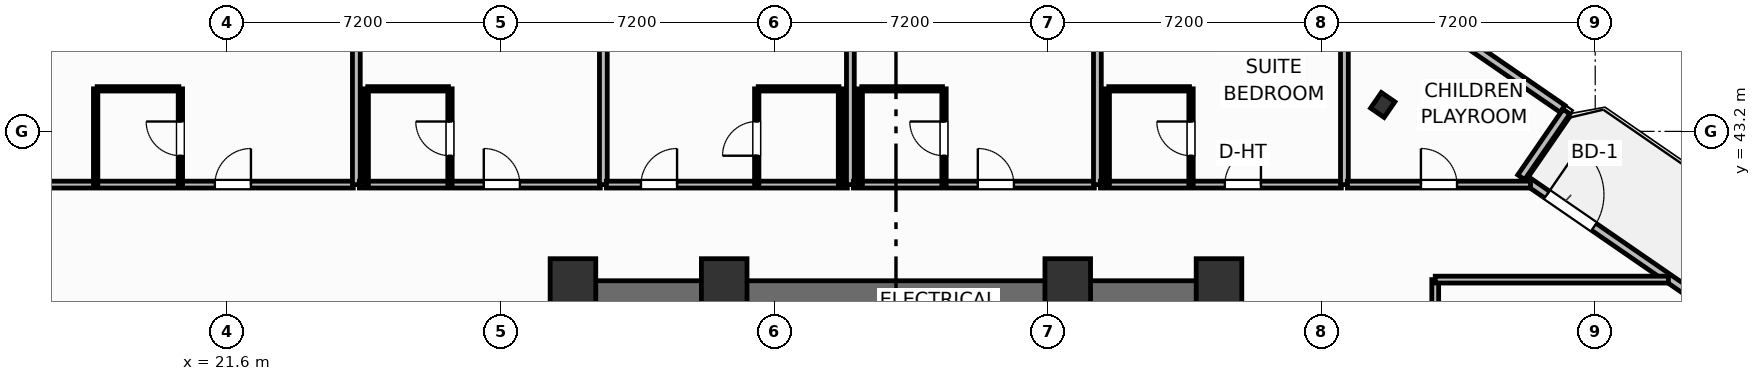
"""IFC4 building model, lengths in metres.
Left out: names, types, materials, properties, quantities, classifications, styles, units other than length and angle.
Written with IfcOpenShell. Run it as: python <this file> out.ifc"""

import sys

from ifc_helpers import new_model, si_unit, direction, frame, frame_2d, origin, origin_2d, place, context, subcontext, project, spatial, rectangle, i_section, extrude, element, fill, save


model = new_model("IFC4")
c1 = context("Model", 3, precision=1e-05, world=origin(), true_north=direction((0.0, 1.0)))
c2 = subcontext(c1, "Body", "Model", "MODEL_VIEW")
j1 = project(units=[si_unit("LENGTHUNIT", "METRE"), si_unit("PLANEANGLEUNIT", "RADIAN")], contexts=[c1])
p1 = place(None, origin())
s1 = spatial("IfcSite", under=j1, at=p1, CompositionType="ELEMENT")
p2 = place(p1, origin())
s2 = spatial("IfcBuilding", under=s1, at=p2, CompositionType="ELEMENT")
p3 = place(p2, frame((0.0, 0.0, 64.0)))
s3 = spatial("IfcBuildingStorey", under=s2, at=p3, CompositionType="ELEMENT", Elevation=64.0)
for number, where, z_axis, x_axis in (
    (1, (30.7, 39.05, 0.0), (0.0, 0.0, 1.0), (1.0, 0.0, 0.0)),
    (2, (34.68, 39.05, 0.0), (0.0, 0.0, 1.0), (1.0, 0.0, 0.0)),
    (3, (43.72, 39.05, 0.0), (0.0, 0.0, 1.0), (1.0, 0.0, 0.0)),
    (4, (47.7, 39.05, 0.0), (0.0, 0.0, 1.0), (1.0, 0.0, 0.0)),
):
    element("IfcColumn", number, at=place(p3, frame(where, z_axis=z_axis, x_axis=x_axis)), inside=s3, PredefinedType="COLUMN", context=c2, shape_type="SweptSolid", body=[
        extrude(rectangle(XDim=1.2, YDim=1.6, at=origin_2d()), origin(), (0.0, 0.0, 1.0), 3.7),
    ])
p4 = place(p3, frame((30.28, 38.845, 0.0), z_axis=(0.0, 0.0, 1.0), x_axis=(1.0, 0.0, 0.0)))
e5 = element("IfcWall", 5, at=p4, inside=s3, PredefinedType="SHEAR", context=c2, shape_type="SweptSolid", body=[
    extrude(rectangle(XDim=17.84, YDim=0.85, at=frame_2d((8.92, 0.0))), origin(), (0.0, 0.0, 1.0), 3.45),
])
p5 = place(p3, frame((52.009, 43.896, 0.0), z_axis=(0.0, 0.0, 1.0), x_axis=(0.823532597628, -0.567268949127, 0.0)))
e6 = element("IfcColumn", 6, at=p5, inside=s3, PredefinedType="COLUMN", context=c2, shape_type="SweptSolid", body=[
    extrude(i_section(OverallWidth=0.432, OverallDepth=0.498, WebThickness=0.056, FlangeThickness=0.089, FilletRadius=0.025, at=origin_2d()), origin(), (0.0, 0.0, 1.0), 3.7),
])
p6 = place(p3, frame((55.757, 41.933, 0.0), z_axis=(0.0, 0.0, 1.0), x_axis=(0.823534636215, -0.567265989598, 0.0)))
e7 = element("IfcWall", 7, at=p6, inside=s3, PredefinedType="SOLIDWALL", context=c2, shape_type="SweptSolid", body=[
    extrude(rectangle(XDim=6.0, YDim=0.22, at=frame_2d((3.0, 0.0))), origin(), (0.0, 0.0, 1.0), 2.73),
])
p7 = place(p6, frame((0.696, 0.0, 0.0)))
e8 = element("IfcOpeningElement", 8, at=p7, cuts=e7, PredefinedType="OPENING", context=c2, shape_type="SweptSolid", body=[
    extrude(rectangle(XDim=1.5, YDim=2.25, at=frame_2d((0.75, 1.125))), frame((0.0, 0.12, 0.0), z_axis=(0.0, -1.0, 0.0), x_axis=(1.0, 0.0, 0.0)), (0.0, 0.0, 1.0), 0.24),
])
p8 = place(p3, frame((55.653, 41.993, 0.0), z_axis=(0.0, 0.0, 1.0), x_axis=(0.567273696173, 0.823529327729, 0.0)))
e9 = element("IfcWall", 9, at=p8, inside=s3, PredefinedType="SOLIDWALL", context=c2, shape_type="SweptSolid", body=[
    extrude(rectangle(XDim=2.1, YDim=0.22, at=frame_2d((1.05, 0.0))), origin(), (0.0, 0.0, 1.0), 2.73),
])
p9 = place(p3, frame((56.741, 43.793, 0.0), z_axis=(0.0, 0.0, 1.0), x_axis=(-0.823530942962, 0.56727135128, 0.0)))
e10 = element("IfcWall", 10, at=p9, inside=s3, PredefinedType="SOLIDWALL", context=c2, shape_type="SweptSolid", body=[
    extrude(rectangle(XDim=8.035, YDim=0.22, at=frame_2d((4.018, 0.0))), origin(), (0.0, 0.0, 1.0), 2.73),
])
p10 = place(p9, frame((3.192, 0.0, 0.8)))
e11 = element("IfcOpeningElement", 11, at=p10, cuts=e10, PredefinedType="OPENING", context=c2, shape_type="SweptSolid", body=[
    extrude(rectangle(XDim=1.65, YDim=1.65, at=frame_2d((0.825, 0.825))), frame((0.0, 0.12, 0.0), z_axis=(0.0, -1.0, 0.0), x_axis=(1.0, 0.0, 0.0)), (0.0, 0.0, 1.0), 0.24),
])
p11 = place(p3, frame((3.176, 41.8, 0.0), z_axis=(0.0, 0.0, 1.0), x_axis=(1.0, 0.0, 0.0)))
e12 = element("IfcWall", 12, at=p11, inside=s3, PredefinedType="PARTITIONING", context=c2, shape_type="SweptSolid", body=[
    extrude(rectangle(XDim=21.744, YDim=0.18, at=frame_2d((10.872, 0.0))), origin(), (0.0, 0.0, 1.0), 3.45),
])
p12 = place(p11, frame((18.101, 0.0, 0.0)))
e13 = element("IfcOpeningElement", 13, at=p12, cuts=e12, PredefinedType="OPENING", context=c2, shape_type="SweptSolid", body=[
    extrude(rectangle(XDim=0.95, YDim=2.15, at=frame_2d((0.475, 1.075))), frame((0.0, 0.1, 0.0), z_axis=(0.0, -1.0, 0.0), x_axis=(1.0, 0.0, 0.0)), (0.0, 0.0, 1.0), 0.2),
])
p13 = place(p3, frame((18.18, 44.32, 0.0), z_axis=(0.0, 0.0, 1.0), x_axis=(1.0, 0.0, 0.0)))
e14 = element("IfcWall", 14, at=p13, inside=s3, PredefinedType="PARTITIONING", context=c2, shape_type="SweptSolid", body=[
    extrude(rectangle(XDim=2.15, YDim=0.115, at=frame_2d((1.075, 0.0))), origin(), (0.0, 0.0, 1.0), 3.45),
])
p14 = place(p3, frame((20.37, 41.8, 0.0), z_axis=(0.0, 0.0, 1.0), x_axis=(0.0, 1.0, 0.0)))
e15 = element("IfcWall", 15, at=p14, inside=s3, PredefinedType="PARTITIONING", context=c2, shape_type="SweptSolid", body=[
    extrude(rectangle(XDim=2.52, YDim=0.115, at=frame_2d((1.26, 0.0))), origin(), (0.0, 0.0, 1.0), 3.45),
])
p15 = place(p14, frame((0.76, 0.0, 0.0)))
e16 = element("IfcOpeningElement", 16, at=p15, cuts=e15, PredefinedType="OPENING", context=c2, shape_type="SweptSolid", body=[
    extrude(rectangle(XDim=0.9, YDim=2.05, at=frame_2d((0.45, 1.025))), frame((0.0, 0.067, 0.0), z_axis=(0.0, -1.0, 0.0), x_axis=(1.0, 0.0, 0.0)), (0.0, 0.0, 1.0), 0.135),
])
p16 = place(p3, frame((18.14, 41.8, 0.0), z_axis=(0.0, 0.0, 1.0), x_axis=(0.0, 1.0, 0.0)))
e17 = element("IfcWall", 17, at=p16, inside=s3, PredefinedType="PARTITIONING", context=c2, shape_type="SweptSolid", body=[
    extrude(rectangle(XDim=2.52, YDim=0.115, at=frame_2d((1.26, 0.0))), origin(), (0.0, 0.0, 1.0), 3.45),
])
p17 = place(p3, frame((25.0, 41.8, 0.0), z_axis=(0.0, 0.0, 1.0), x_axis=(0.0, 1.0, 0.0)))
e18 = element("IfcWall", 18, at=p17, inside=s3, PredefinedType="PARTITIONING", context=c2, shape_type="SweptSolid", body=[
    extrude(rectangle(XDim=14.2, YDim=0.205, at=frame_2d((7.1, 0.0))), origin(), (0.0, 0.0, 1.0), 3.45),
])
p18 = place(p3, frame((25.08, 41.8, 0.0), z_axis=(0.0, 0.0, 1.0), x_axis=(1.0, 0.0, 0.0)))
e19 = element("IfcWall", 19, at=p18, inside=s3, PredefinedType="PARTITIONING", context=c2, shape_type="SweptSolid", body=[
    extrude(rectangle(XDim=6.34, YDim=0.18, at=frame_2d((3.17, 0.0))), origin(), (0.0, 0.0, 1.0), 3.45),
])
p19 = place(p18, frame((3.274, 0.0, 0.0)))
e20 = element("IfcOpeningElement", 20, at=p19, cuts=e19, PredefinedType="OPENING", context=c2, shape_type="SweptSolid", body=[
    extrude(rectangle(XDim=0.95, YDim=2.15, at=frame_2d((0.475, 1.075))), frame((0.0, 0.1, 0.0), z_axis=(0.0, -1.0, 0.0), x_axis=(1.0, 0.0, 0.0)), (0.0, 0.0, 1.0), 0.2),
])
p20 = place(p3, frame((25.3, 44.32, 0.0), z_axis=(0.0, 0.0, 1.0), x_axis=(1.0, 0.0, 0.0)))
e21 = element("IfcWall", 21, at=p20, inside=s3, PredefinedType="PARTITIONING", context=c2, shape_type="SweptSolid", body=[
    extrude(rectangle(XDim=2.124, YDim=0.115, at=frame_2d((1.062, 0.0))), origin(), (0.0, 0.0, 1.0), 3.45),
])
p21 = place(p3, frame((27.464, 41.8, 0.0), z_axis=(0.0, 0.0, 1.0), x_axis=(0.0, 1.0, 0.0)))
e22 = element("IfcWall", 22, at=p21, inside=s3, PredefinedType="PARTITIONING", context=c2, shape_type="SweptSolid", body=[
    extrude(rectangle(XDim=2.52, YDim=0.115, at=frame_2d((1.26, 0.0))), origin(), (0.0, 0.0, 1.0), 3.45),
])
p22 = place(p21, frame((0.76, 0.0, 0.0)))
e23 = element("IfcOpeningElement", 23, at=p22, cuts=e22, PredefinedType="OPENING", context=c2, shape_type="SweptSolid", body=[
    extrude(rectangle(XDim=0.9, YDim=2.05, at=frame_2d((0.45, 1.025))), frame((0.0, 0.067, 0.0), z_axis=(0.0, -1.0, 0.0), x_axis=(1.0, 0.0, 0.0)), (0.0, 0.0, 1.0), 0.135),
])
p23 = place(p3, frame((25.26, 41.8, 0.0), z_axis=(0.0, 0.0, 1.0), x_axis=(0.0, 1.0, 0.0)))
e24 = element("IfcWall", 24, at=p23, inside=s3, PredefinedType="PARTITIONING", context=c2, shape_type="SweptSolid", body=[
    extrude(rectangle(XDim=2.52, YDim=0.115, at=frame_2d((1.26, 0.0))), origin(), (0.0, 0.0, 1.0), 3.45),
])
p24 = place(p3, frame((31.5, 41.8, 0.0), z_axis=(0.0, 0.0, 1.0), x_axis=(0.0, 1.0, 0.0)))
e25 = element("IfcWall", 25, at=p24, inside=s3, PredefinedType="PARTITIONING", context=c2, shape_type="SweptSolid", body=[
    extrude(rectangle(XDim=14.2, YDim=0.205, at=frame_2d((7.1, 0.0))), origin(), (0.0, 0.0, 1.0), 3.45),
])
p25 = place(p3, frame((31.58, 41.8, 0.0), z_axis=(0.0, 0.0, 1.0), x_axis=(1.0, 0.0, 0.0)))
e26 = element("IfcWall", 26, at=p25, inside=s3, PredefinedType="PARTITIONING", context=c2, shape_type="SweptSolid", body=[
    extrude(rectangle(XDim=6.34, YDim=0.18, at=frame_2d((3.17, 0.0))), origin(), (0.0, 0.0, 1.0), 3.45),
])
p26 = place(p25, frame((0.91, 0.0, 0.0)))
e27 = element("IfcOpeningElement", 27, at=p26, cuts=e26, PredefinedType="OPENING", context=c2, shape_type="SweptSolid", body=[
    extrude(rectangle(XDim=0.95, YDim=2.15, at=frame_2d((0.475, 1.075))), frame((0.0, 0.1, 0.0), z_axis=(0.0, -1.0, 0.0), x_axis=(1.0, 0.0, 0.0)), (0.0, 0.0, 1.0), 0.2),
])
p27 = place(p3, frame((35.576, 44.32, 0.0), z_axis=(0.0, 0.0, 1.0), x_axis=(1.0, 0.0, 0.0)))
e28 = element("IfcWall", 28, at=p27, inside=s3, PredefinedType="PARTITIONING", context=c2, shape_type="SweptSolid", body=[
    extrude(rectangle(XDim=2.124, YDim=0.115, at=frame_2d((1.062, 0.0))), origin(), (0.0, 0.0, 1.0), 3.45),
])
p28 = place(p3, frame((35.536, 41.8, 0.0), z_axis=(0.0, 0.0, 1.0), x_axis=(0.0, 1.0, 0.0)))
e29 = element("IfcWall", 29, at=p28, inside=s3, PredefinedType="PARTITIONING", context=c2, shape_type="SweptSolid", body=[
    extrude(rectangle(XDim=2.52, YDim=0.115, at=frame_2d((1.26, 0.0))), origin(), (0.0, 0.0, 1.0), 3.45),
])
p29 = place(p28, frame((0.76, 0.0, 0.0)))
e30 = element("IfcOpeningElement", 30, at=p29, cuts=e29, PredefinedType="OPENING", context=c2, shape_type="SweptSolid", body=[
    extrude(rectangle(XDim=0.9, YDim=2.05, at=frame_2d((0.45, 1.025))), frame((0.0, 0.067, 0.0), z_axis=(0.0, -1.0, 0.0), x_axis=(1.0, 0.0, 0.0)), (0.0, 0.0, 1.0), 0.135),
])
p30 = place(p3, frame((37.74, 41.8, 0.0), z_axis=(0.0, 0.0, 1.0), x_axis=(0.0, 1.0, 0.0)))
e31 = element("IfcWall", 31, at=p30, inside=s3, PredefinedType="PARTITIONING", context=c2, shape_type="SweptSolid", body=[
    extrude(rectangle(XDim=2.52, YDim=0.115, at=frame_2d((1.26, 0.0))), origin(), (0.0, 0.0, 1.0), 3.45),
])
p31 = place(p3, frame((38.0, 41.8, 0.0), z_axis=(0.0, 0.0, 1.0), x_axis=(0.0, 1.0, 0.0)))
e32 = element("IfcWall", 32, at=p31, inside=s3, PredefinedType="PARTITIONING", context=c2, shape_type="SweptSolid", body=[
    extrude(rectangle(XDim=14.797, YDim=0.205, at=frame_2d((7.398, 0.0))), origin(), (0.0, 0.0, 1.0), 3.45),
])
p32 = place(p3, frame((38.08, 41.8, 0.0), z_axis=(0.0, 0.0, 1.0), x_axis=(1.0, 0.0, 0.0)))
e33 = element("IfcWall", 33, at=p32, inside=s3, PredefinedType="PARTITIONING", context=c2, shape_type="SweptSolid", body=[
    extrude(rectangle(XDim=6.34, YDim=0.18, at=frame_2d((3.17, 0.0))), origin(), (0.0, 0.0, 1.0), 3.45),
])
p33 = place(p32, frame((3.274, 0.0, 0.0)))
e34 = element("IfcOpeningElement", 34, at=p33, cuts=e33, PredefinedType="OPENING", context=c2, shape_type="SweptSolid", body=[
    extrude(rectangle(XDim=0.95, YDim=2.15, at=frame_2d((0.475, 1.075))), frame((0.0, 0.1, 0.0), z_axis=(0.0, -1.0, 0.0), x_axis=(1.0, 0.0, 0.0)), (0.0, 0.0, 1.0), 0.2),
])
p34 = place(p3, frame((38.3, 44.32, 0.0), z_axis=(0.0, 0.0, 1.0), x_axis=(1.0, 0.0, 0.0)))
e35 = element("IfcWall", 35, at=p34, inside=s3, PredefinedType="PARTITIONING", context=c2, shape_type="SweptSolid", body=[
    extrude(rectangle(XDim=2.124, YDim=0.115, at=frame_2d((1.062, 0.0))), origin(), (0.0, 0.0, 1.0), 3.45),
])
p35 = place(p3, frame((40.464, 41.8, 0.0), z_axis=(0.0, 0.0, 1.0), x_axis=(0.0, 1.0, 0.0)))
e36 = element("IfcWall", 36, at=p35, inside=s3, PredefinedType="PARTITIONING", context=c2, shape_type="SweptSolid", body=[
    extrude(rectangle(XDim=2.52, YDim=0.115, at=frame_2d((1.26, 0.0))), origin(), (0.0, 0.0, 1.0), 3.45),
])
p36 = place(p35, frame((0.76, 0.0, 0.0)))
e37 = element("IfcOpeningElement", 37, at=p36, cuts=e36, PredefinedType="OPENING", context=c2, shape_type="SweptSolid", body=[
    extrude(rectangle(XDim=0.9, YDim=2.05, at=frame_2d((0.45, 1.025))), frame((0.0, 0.067, 0.0), z_axis=(0.0, -1.0, 0.0), x_axis=(1.0, 0.0, 0.0)), (0.0, 0.0, 1.0), 0.135),
])
p37 = place(p3, frame((38.26, 41.8, 0.0), z_axis=(0.0, 0.0, 1.0), x_axis=(0.0, 1.0, 0.0)))
e38 = element("IfcWall", 38, at=p37, inside=s3, PredefinedType="PARTITIONING", context=c2, shape_type="SweptSolid", body=[
    extrude(rectangle(XDim=2.52, YDim=0.115, at=frame_2d((1.26, 0.0))), origin(), (0.0, 0.0, 1.0), 3.45),
])
p38 = place(p3, frame((44.5, 41.8, 0.0), z_axis=(0.0, 0.0, 1.0), x_axis=(0.0, 1.0, 0.0)))
e39 = element("IfcWall", 39, at=p38, inside=s3, PredefinedType="PARTITIONING", context=c2, shape_type="SweptSolid", body=[
    extrude(rectangle(XDim=7.851, YDim=0.205, at=frame_2d((3.925, 0.0))), origin(), (0.0, 0.0, 1.0), 3.45),
])
p39 = place(p3, frame((44.58, 41.8, 0.0), z_axis=(0.0, 0.0, 1.0), x_axis=(1.0, 0.0, 0.0)))
e40 = element("IfcWall", 40, at=p39, inside=s3, PredefinedType="PARTITIONING", context=c2, shape_type="SweptSolid", body=[
    extrude(rectangle(XDim=6.34, YDim=0.18, at=frame_2d((3.17, 0.0))), origin(), (0.0, 0.0, 1.0), 3.45),
])
p40 = place(p39, frame((3.274, 0.0, 0.0)))
e41 = element("IfcOpeningElement", 41, at=p40, cuts=e40, PredefinedType="OPENING", context=c2, shape_type="SweptSolid", body=[
    extrude(rectangle(XDim=0.95, YDim=2.15, at=frame_2d((0.475, 1.075))), frame((0.0, 0.1, 0.0), z_axis=(0.0, -1.0, 0.0), x_axis=(1.0, 0.0, 0.0)), (0.0, 0.0, 1.0), 0.2),
])
p41 = place(p3, frame((44.8, 44.32, 0.0), z_axis=(0.0, 0.0, 1.0), x_axis=(1.0, 0.0, 0.0)))
e42 = element("IfcWall", 42, at=p41, inside=s3, PredefinedType="PARTITIONING", context=c2, shape_type="SweptSolid", body=[
    extrude(rectangle(XDim=2.124, YDim=0.115, at=frame_2d((1.062, 0.0))), origin(), (0.0, 0.0, 1.0), 3.45),
])
p42 = place(p3, frame((46.964, 41.8, 0.0), z_axis=(0.0, 0.0, 1.0), x_axis=(0.0, 1.0, 0.0)))
e43 = element("IfcWall", 43, at=p42, inside=s3, PredefinedType="PARTITIONING", context=c2, shape_type="SweptSolid", body=[
    extrude(rectangle(XDim=2.52, YDim=0.115, at=frame_2d((1.26, 0.0))), origin(), (0.0, 0.0, 1.0), 2.58),
])
p43 = place(p42, frame((0.76, 0.0, 0.0)))
e44 = element("IfcOpeningElement", 44, at=p43, cuts=e43, PredefinedType="OPENING", context=c2, shape_type="SweptSolid", body=[
    extrude(rectangle(XDim=0.9, YDim=2.05, at=frame_2d((0.45, 1.025))), frame((0.0, 0.067, 0.0), z_axis=(0.0, -1.0, 0.0), x_axis=(1.0, 0.0, 0.0)), (0.0, 0.0, 1.0), 0.135),
])
p44 = place(p3, frame((44.76, 41.8, 0.0), z_axis=(0.0, 0.0, 1.0), x_axis=(0.0, 1.0, 0.0)))
e45 = element("IfcWall", 45, at=p44, inside=s3, PredefinedType="PARTITIONING", context=c2, shape_type="SweptSolid", body=[
    extrude(rectangle(XDim=2.52, YDim=0.115, at=frame_2d((1.26, 0.0))), origin(), (0.0, 0.0, 1.0), 3.45),
])
p45 = place(p3, frame((51.0, 41.8, 0.0), z_axis=(0.0, 0.0, 1.0), x_axis=(0.0, 1.0, 0.0)))
e46 = element("IfcWall", 46, at=p45, inside=s3, PredefinedType="PARTITIONING", context=c2, shape_type="SweptSolid", body=[
    extrude(rectangle(XDim=5.923, YDim=0.205, at=frame_2d((2.961, 0.0))), origin(), (0.0, 0.0, 1.0), 3.45),
])
p46 = place(p3, frame((51.08, 41.8, 0.0), z_axis=(0.0, 0.0, 1.0), x_axis=(1.0, 0.0, 0.0)))
e47 = element("IfcWall", 47, at=p46, inside=s3, PredefinedType="PARTITIONING", context=c2, shape_type="SweptSolid", body=[
    extrude(rectangle(XDim=4.817, YDim=0.18, at=frame_2d((2.408, 0.0))), origin(), (0.0, 0.0, 1.0), 3.45),
])
p47 = place(p46, frame((1.934, 0.0, 0.0)))
e48 = element("IfcOpeningElement", 48, at=p47, cuts=e47, PredefinedType="OPENING", context=c2, shape_type="SweptSolid", body=[
    extrude(rectangle(XDim=0.95, YDim=2.05, at=frame_2d((0.475, 1.025))), frame((0.0, 0.1, 0.0), z_axis=(0.0, -1.0, 0.0), x_axis=(1.0, 0.0, 0.0)), (0.0, 0.0, 1.0), 0.2),
])
p48 = place(p3, frame((53.39, 26.84, 0.0), z_axis=(0.0, 0.0, 1.0), x_axis=(0.0, 1.0, 0.0)))
e49 = element("IfcWall", 49, at=p48, inside=s3, PredefinedType="PARTITIONING", context=c2, shape_type="SweptSolid", body=[
    extrude(rectangle(XDim=12.46, YDim=0.18, at=frame_2d((6.23, 0.0))), origin(), (0.0, 0.0, 1.0), 3.45),
])
p49 = place(p48, frame((0.618, 0.0, 0.0)))
e50 = element("IfcOpeningElement", 50, at=p49, cuts=e49, PredefinedType="OPENING", context=c2, shape_type="SweptSolid", body=[
    extrude(rectangle(XDim=0.92, YDim=2.05, at=frame_2d((0.46, 1.025))), frame((0.0, 0.1, 0.0), z_axis=(0.0, -1.0, 0.0), x_axis=(1.0, 0.0, 0.0)), (0.0, 0.0, 1.0), 0.2),
])
p50 = place(p3, frame((53.39, 39.3, 0.0), z_axis=(0.0, 0.0, 1.0), x_axis=(1.0, 0.0, 0.0)))
e51 = element("IfcWall", 51, at=p50, inside=s3, PredefinedType="PARTITIONING", context=c2, shape_type="SweptSolid", body=[
    extrude(rectangle(XDim=6.136, YDim=0.18, at=frame_2d((3.068, 0.0))), origin(), (0.0, 0.0, 1.0), 3.45),
])
p51 = place(p7, origin())
e52 = element("IfcDoor", 52, at=p51, inside=s3, OperationType="SINGLE_SWING_LEFT", PredefinedType="DOOR", context=c2, shape_type="SweptSolid", body=[
    extrude(rectangle(XDim=1.5, YDim=2.25, at=frame_2d((0.75, 1.125))), frame((0.0, 0.025, 0.0), z_axis=(0.0, -1.0, 0.0), x_axis=(1.0, 0.0, 0.0)), (0.0, 0.0, 1.0), 0.05),
])
fill(e8, e52)
p52 = place(p12, origin())
e53 = element("IfcDoor", 53, at=p52, inside=s3, OperationType="SINGLE_SWING_RIGHT", PredefinedType="DOOR", context=c2, shape_type="SweptSolid", body=[
    extrude(rectangle(XDim=0.95, YDim=2.15, at=frame_2d((0.475, 1.075))), frame((0.0, 0.025, 0.0), z_axis=(0.0, -1.0, 0.0), x_axis=(1.0, 0.0, 0.0)), (0.0, 0.0, 1.0), 0.05),
])
fill(e13, e53)
p53 = place(p15, origin())
e54 = element("IfcDoor", 54, at=p53, inside=s3, OperationType="SINGLE_SWING_RIGHT", PredefinedType="DOOR", context=c2, shape_type="SweptSolid", body=[
    extrude(rectangle(XDim=0.9, YDim=2.05, at=frame_2d((0.45, 1.025))), frame((0.0, 0.025, 0.0), z_axis=(0.0, -1.0, 0.0), x_axis=(1.0, 0.0, 0.0)), (0.0, 0.0, 1.0), 0.05),
])
fill(e16, e54)
p54 = place(p19, origin())
e55 = element("IfcDoor", 55, at=p54, inside=s3, OperationType="SINGLE_SWING_LEFT", PredefinedType="DOOR", context=c2, shape_type="SweptSolid", body=[
    extrude(rectangle(XDim=0.95, YDim=2.15, at=frame_2d((0.475, 1.075))), frame((0.0, 0.025, 0.0), z_axis=(0.0, -1.0, 0.0), x_axis=(1.0, 0.0, 0.0)), (0.0, 0.0, 1.0), 0.05),
])
fill(e20, e55)
p55 = place(p22, origin())
e56 = element("IfcDoor", 56, at=p55, inside=s3, OperationType="SINGLE_SWING_RIGHT", PredefinedType="DOOR", context=c2, shape_type="SweptSolid", body=[
    extrude(rectangle(XDim=0.9, YDim=2.05, at=frame_2d((0.45, 1.025))), frame((0.0, 0.025, 0.0), z_axis=(0.0, -1.0, 0.0), x_axis=(1.0, 0.0, 0.0)), (0.0, 0.0, 1.0), 0.05),
])
fill(e23, e56)
p56 = place(p26, origin())
e57 = element("IfcDoor", 57, at=p56, inside=s3, OperationType="SINGLE_SWING_RIGHT", PredefinedType="DOOR", context=c2, shape_type="SweptSolid", body=[
    extrude(rectangle(XDim=0.95, YDim=2.15, at=frame_2d((0.475, 1.075))), frame((0.0, 0.025, 0.0), z_axis=(0.0, -1.0, 0.0), x_axis=(1.0, 0.0, 0.0)), (0.0, 0.0, 1.0), 0.05),
])
fill(e27, e57)
p57 = place(p29, origin())
e58 = element("IfcDoor", 58, at=p57, inside=s3, OperationType="SINGLE_SWING_LEFT", PredefinedType="DOOR", context=c2, shape_type="SweptSolid", body=[
    extrude(rectangle(XDim=0.9, YDim=2.05, at=frame_2d((0.45, 1.025))), frame((0.0, 0.025, 0.0), z_axis=(0.0, -1.0, 0.0), x_axis=(1.0, 0.0, 0.0)), (0.0, 0.0, 1.0), 0.05),
])
fill(e30, e58)
p58 = place(p33, origin())
e59 = element("IfcDoor", 59, at=p58, inside=s3, OperationType="SINGLE_SWING_LEFT", PredefinedType="DOOR", context=c2, shape_type="SweptSolid", body=[
    extrude(rectangle(XDim=0.95, YDim=2.15, at=frame_2d((0.475, 1.075))), frame((0.0, 0.025, 0.0), z_axis=(0.0, -1.0, 0.0), x_axis=(1.0, 0.0, 0.0)), (0.0, 0.0, 1.0), 0.05),
])
fill(e34, e59)
p59 = place(p36, origin())
e60 = element("IfcDoor", 60, at=p59, inside=s3, OperationType="SINGLE_SWING_RIGHT", PredefinedType="DOOR", context=c2, shape_type="SweptSolid", body=[
    extrude(rectangle(XDim=0.9, YDim=2.05, at=frame_2d((0.45, 1.025))), frame((0.0, 0.025, 0.0), z_axis=(0.0, -1.0, 0.0), x_axis=(1.0, 0.0, 0.0)), (0.0, 0.0, 1.0), 0.05),
])
fill(e37, e60)
p60 = place(p40, origin())
e61 = element("IfcDoor", 61, at=p60, inside=s3, OperationType="SINGLE_SWING_RIGHT", PredefinedType="DOOR", context=c2, shape_type="SweptSolid", body=[
    extrude(rectangle(XDim=0.95, YDim=2.15, at=frame_2d((0.475, 1.075))), frame((0.0, 0.025, 0.0), z_axis=(0.0, -1.0, 0.0), x_axis=(1.0, 0.0, 0.0)), (0.0, 0.0, 1.0), 0.05),
])
fill(e41, e61)
p61 = place(p43, origin())
e62 = element("IfcDoor", 62, at=p61, inside=s3, OperationType="SINGLE_SWING_RIGHT", PredefinedType="DOOR", context=c2, shape_type="SweptSolid", body=[
    extrude(rectangle(XDim=0.9, YDim=2.05, at=frame_2d((0.45, 1.025))), frame((0.0, 0.025, 0.0), z_axis=(0.0, -1.0, 0.0), x_axis=(1.0, 0.0, 0.0)), (0.0, 0.0, 1.0), 0.05),
])
fill(e44, e62)
p62 = place(p47, origin())
e63 = element("IfcDoor", 63, at=p62, inside=s3, OperationType="SINGLE_SWING_LEFT", PredefinedType="DOOR", context=c2, shape_type="SweptSolid", body=[
    extrude(rectangle(XDim=0.95, YDim=2.05, at=frame_2d((0.475, 1.025))), frame((0.0, 0.025, 0.0), z_axis=(0.0, -1.0, 0.0), x_axis=(1.0, 0.0, 0.0)), (0.0, 0.0, 1.0), 0.05),
])
fill(e48, e63)
save(model, sys.argv[1])
